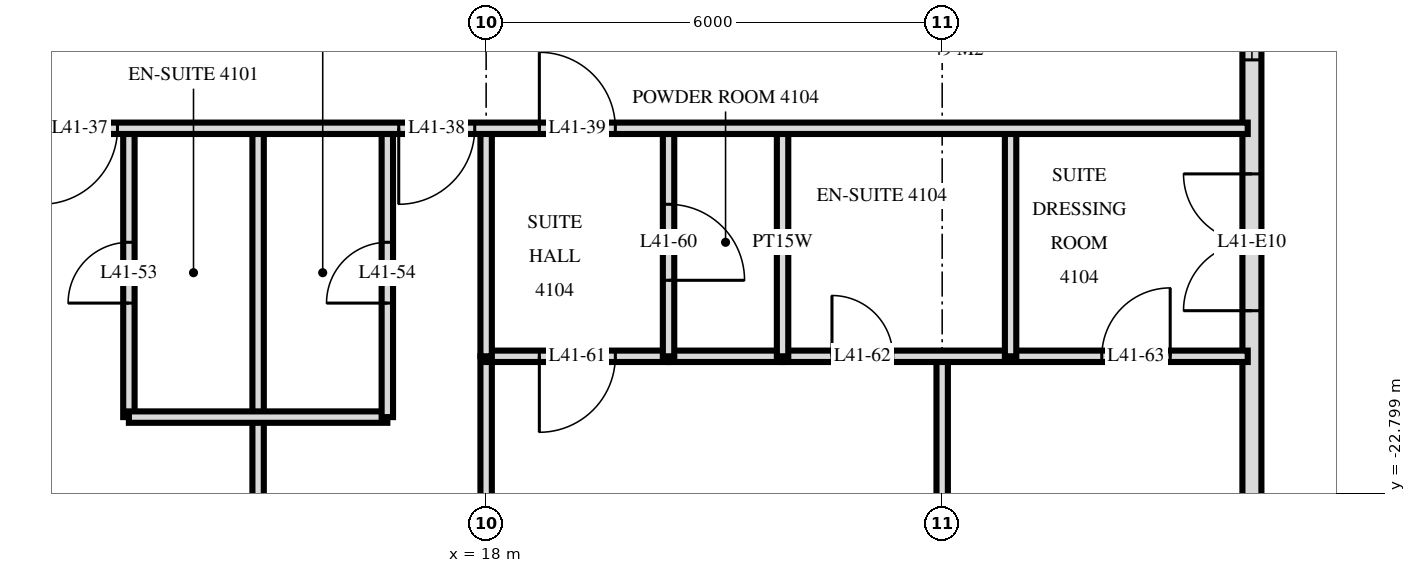
"""IFC4 building model, lengths in metres.
Left out: names, types, materials, properties, quantities, classifications, styles, units other than length and angle.
Written with IfcOpenShell. Run it as: python <this file> out.ifc"""

import sys

from ifc_helpers import new_model, si_unit, direction, frame, frame_2d, origin, place, context, subcontext, project, spatial, rectangle, extrude, element, fill, save


model = new_model("IFC4")
c1 = context("Model", 3, precision=1e-05, world=origin(), true_north=direction((0.0, 1.0)))
c2 = subcontext(c1, "Body", "Model", "MODEL_VIEW")
j1 = project(units=[si_unit("LENGTHUNIT", "METRE"), si_unit("PLANEANGLEUNIT", "RADIAN")], contexts=[c1])
p1 = place(None, origin())
s1 = spatial("IfcSite", under=j1, at=p1, CompositionType="ELEMENT")
p2 = place(p1, origin())
s2 = spatial("IfcBuilding", under=s1, at=p2, CompositionType="ELEMENT")
p3 = place(p2, frame((0.0, 0.0, 159.6)))
s3 = spatial("IfcBuildingStorey", under=s2, at=p3, CompositionType="ELEMENT", Elevation=159.6)
p4 = place(p3, frame((28.075, -29.275, 0.0), z_axis=(0.0, 0.0, 1.0), x_axis=(0.0, 1.0, 0.0)))
e1 = element("IfcWall", 1, at=p4, inside=s3, PredefinedType="SOLIDWALL", context=c2, shape_type="SweptSolid", body=[
    extrude(rectangle(XDim=25.951, YDim=0.25, at=frame_2d((12.975, 0.0))), origin(), (0.0, 0.0, 1.0), 3.32),
])
p5 = place(p4, frame((0.575, 0.0, 0.0)))
e2 = element("IfcOpeningElement", 2, at=p5, cuts=e1, PredefinedType="OPENING", context=c2, shape_type="SweptSolid", body=[
    extrude(rectangle(XDim=1.8, YDim=2.4, at=frame_2d((0.9, 1.2))), frame((0.0, 0.135, 0.0), z_axis=(0.0, -1.0, 0.0), x_axis=(1.0, 0.0, 0.0)), (0.0, 0.0, 1.0), 0.27),
])
p6 = place(p4, frame((3.325, 0.0, 0.3)))
e3 = element("IfcOpeningElement", 3, at=p6, cuts=e1, PredefinedType="OPENING", context=c2, shape_type="SweptSolid", body=[
    extrude(rectangle(XDim=1.8, YDim=2.1, at=frame_2d((0.9, 1.05))), frame((0.0, 0.135, 0.0), z_axis=(0.0, -1.0, 0.0), x_axis=(1.0, 0.0, 0.0)), (0.0, 0.0, 1.0), 0.27),
])
p7 = place(p4, frame((8.875, 0.0, 0.0)))
e4 = element("IfcOpeningElement", 4, at=p7, cuts=e1, PredefinedType="OPENING", context=c2, shape_type="SweptSolid", body=[
    extrude(rectangle(XDim=1.8, YDim=2.4, at=frame_2d((0.9, 1.2))), frame((0.0, 0.135, 0.0), z_axis=(0.0, -1.0, 0.0), x_axis=(1.0, 0.0, 0.0)), (0.0, 0.0, 1.0), 0.27),
])
p8 = place(p4, frame((12.175, 0.0, 0.3)))
e5 = element("IfcOpeningElement", 5, at=p8, cuts=e1, PredefinedType="OPENING", context=c2, shape_type="SweptSolid", body=[
    extrude(rectangle(XDim=1.2, YDim=2.1, at=frame_2d((0.6, 1.05))), frame((0.0, 0.135, 0.0), z_axis=(0.0, -1.0, 0.0), x_axis=(1.0, 0.0, 0.0)), (0.0, 0.0, 1.0), 0.27),
])
p9 = place(p4, frame((17.5, 0.0, 0.0)))
e6 = element("IfcOpeningElement", 6, at=p9, cuts=e1, PredefinedType="OPENING", context=c2, shape_type="SweptSolid", body=[
    extrude(rectangle(XDim=1.8, YDim=2.4, at=frame_2d((0.9, 1.2))), frame((0.0, 0.135, 0.0), z_axis=(0.0, -1.0, 0.0), x_axis=(1.0, 0.0, 0.0)), (0.0, 0.0, 1.0), 0.27),
])
p10 = place(p3, frame((24.9, -21.0, 0.0), z_axis=(0.0, 0.0, 1.0), x_axis=(0.0, 1.0, 0.0)))
e7 = element("IfcWall", 7, at=p10, inside=s3, PredefinedType="PARTITIONING", context=c2, shape_type="SweptSolid", body=[
    extrude(rectangle(XDim=3.0, YDim=0.15, at=frame_2d((1.5, 0.0))), origin(), (0.0, 0.0, 1.0), 3.32),
])
p11 = place(p3, frame((24.0, -33.557, 0.0), z_axis=(0.0, 0.0, 1.0), x_axis=(0.0, 1.0, 0.0)))
e8 = element("IfcWall", 8, at=p11, inside=s3, PredefinedType="PARTITIONING", context=c2, shape_type="SweptSolid", body=[
    extrude(rectangle(XDim=12.557, YDim=0.15, at=frame_2d((6.278, 0.0))), origin(), (0.0, 0.0, 1.0), 3.32),
])
p12 = place(p11, frame((5.737, 0.0, 0.0)))
e9 = element("IfcOpeningElement", 9, at=p12, cuts=e8, PredefinedType="OPENING", context=c2, shape_type="SweptSolid", body=[
    extrude(rectangle(XDim=0.9, YDim=2.1, at=frame_2d((0.45, 1.05))), frame((0.0, 0.085, 0.0), z_axis=(0.0, -1.0, 0.0), x_axis=(1.0, 0.0, 0.0)), (0.0, 0.0, 1.0), 0.17),
])
p13 = place(p3, frame((21.9, -21.0, 0.0), z_axis=(0.0, 0.0, 1.0), x_axis=(0.0, 1.0, 0.0)))
e10 = element("IfcWall", 10, at=p13, inside=s3, PredefinedType="PLUMBINGWALL", context=c2, shape_type="SweptSolid", body=[
    extrude(rectangle(XDim=3.0, YDim=0.15, at=frame_2d((1.5, 0.0))), origin(), (0.0, 0.0, 1.0), 3.32),
])
p14 = place(p3, frame((20.4, -21.0, 0.0), z_axis=(0.0, 0.0, 1.0), x_axis=(0.0, 1.0, 0.0)))
e11 = element("IfcWall", 11, at=p14, inside=s3, PredefinedType="PARTITIONING", context=c2, shape_type="SweptSolid", body=[
    extrude(rectangle(XDim=3.0, YDim=0.15, at=frame_2d((1.5, 0.0))), origin(), (0.0, 0.0, 1.0), 3.32),
])
p15 = place(p14, frame((1.0, 0.0, 0.0)))
e12 = element("IfcOpeningElement", 12, at=p15, cuts=e11, PredefinedType="OPENING", context=c2, shape_type="SweptSolid", body=[
    extrude(rectangle(XDim=1.0, YDim=2.1, at=frame_2d((0.5, 1.05))), frame((0.0, 0.085, 0.0), z_axis=(0.0, -1.0, 0.0), x_axis=(1.0, 0.0, 0.0)), (0.0, 0.0, 1.0), 0.17),
])
p16 = place(p3, frame((18.0, -21.0, 0.0), z_axis=(0.0, 0.0, 1.0), x_axis=(0.0, 1.0, 0.0)))
e13 = element("IfcWall", 13, at=p16, inside=s3, PredefinedType="PARTITIONING", context=c2, shape_type="SweptSolid", body=[
    extrude(rectangle(XDim=3.0, YDim=0.15, at=frame_2d((1.5, 0.0))), origin(), (0.0, 0.0, 1.0), 3.32),
])
p17 = place(p3, frame((18.0, -33.62, 0.0), z_axis=(0.0, 0.0, 1.0), x_axis=(0.0, 1.0, 0.0)))
e14 = element("IfcWall", 14, at=p17, inside=s3, PredefinedType="PARTITIONING", context=c2, shape_type="SweptSolid", body=[
    extrude(rectangle(XDim=12.62, YDim=0.15, at=frame_2d((6.31, 0.0))), origin(), (0.0, 0.0, 1.0), 3.32),
])
p18 = place(p3, frame((16.7, -21.8, 0.0), z_axis=(0.0, 0.0, 1.0), x_axis=(0.0, 1.0, 0.0)))
e15 = element("IfcWall", 15, at=p18, inside=s3, PredefinedType="PARTITIONING", context=c2, shape_type="SweptSolid", body=[
    extrude(rectangle(XDim=3.8, YDim=0.15, at=frame_2d((1.9, 0.0))), origin(), (0.0, 0.0, 1.0), 3.32),
])
p19 = place(p18, frame((1.5, 0.0, 0.0)))
e16 = element("IfcOpeningElement", 16, at=p19, cuts=e15, PredefinedType="OPENING", context=c2, shape_type="SweptSolid", body=[
    extrude(rectangle(XDim=0.8, YDim=2.1, at=frame_2d((0.4, 1.05))), frame((0.0, 0.085, 0.0), z_axis=(0.0, -1.0, 0.0), x_axis=(1.0, 0.0, 0.0)), (0.0, 0.0, 1.0), 0.17),
])
p20 = place(p3, frame((15.0, -33.62, 0.0), z_axis=(0.0, 0.0, 1.0), x_axis=(0.0, 1.0, 0.0)))
e17 = element("IfcWall", 17, at=p20, inside=s3, PredefinedType="PARTITIONING", context=c2, shape_type="SweptSolid", body=[
    extrude(rectangle(XDim=15.62, YDim=0.15, at=frame_2d((7.81, 0.0))), origin(), (0.0, 0.0, 1.0), 3.32),
])
p21 = place(p3, frame((13.3, -21.8, 0.0), z_axis=(0.0, 0.0, 1.0), x_axis=(0.0, 1.0, 0.0)))
e18 = element("IfcWall", 18, at=p21, inside=s3, PredefinedType="PARTITIONING", context=c2, shape_type="SweptSolid", body=[
    extrude(rectangle(XDim=3.8, YDim=0.15, at=frame_2d((1.9, 0.0))), origin(), (0.0, 0.0, 1.0), 3.32),
])
p22 = place(p21, frame((1.5, 0.0, 0.0)))
e19 = element("IfcOpeningElement", 19, at=p22, cuts=e18, PredefinedType="OPENING", context=c2, shape_type="SweptSolid", body=[
    extrude(rectangle(XDim=0.8, YDim=2.1, at=frame_2d((0.4, 1.05))), frame((0.0, 0.085, 0.0), z_axis=(0.0, -1.0, 0.0), x_axis=(1.0, 0.0, 0.0)), (0.0, 0.0, 1.0), 0.17),
])
p23 = place(p3, frame((13.3, -21.8, 0.0), z_axis=(0.0, 0.0, 1.0), x_axis=(1.0, 0.0, 0.0)))
e20 = element("IfcWall", 20, at=p23, inside=s3, PredefinedType="PARTITIONING", context=c2, shape_type="SweptSolid", body=[
    extrude(rectangle(XDim=3.4, YDim=0.15, at=frame_2d((1.7, 0.0))), origin(), (0.0, 0.0, 1.0), 3.32),
])
p24 = place(p3, frame((18.0, -21.0, 0.0), z_axis=(0.0, 0.0, 1.0), x_axis=(1.0, 0.0, 0.0)))
e21 = element("IfcWall", 21, at=p24, inside=s3, PredefinedType="PARTITIONING", context=c2, shape_type="SweptSolid", body=[
    extrude(rectangle(XDim=2.4, YDim=0.15, at=frame_2d((1.2, 0.0))), origin(), (0.0, 0.0, 1.0), 3.32),
])
p25 = place(p24, frame((0.7, 0.0, 0.0)))
e22 = element("IfcOpeningElement", 22, at=p25, cuts=e21, PredefinedType="OPENING", context=c2, shape_type="SweptSolid", body=[
    extrude(rectangle(XDim=1.0, YDim=2.1, at=frame_2d((0.5, 1.05))), frame((0.0, 0.085, 0.0), z_axis=(0.0, -1.0, 0.0), x_axis=(1.0, 0.0, 0.0)), (0.0, 0.0, 1.0), 0.17),
])
p26 = place(p3, frame((21.9, -21.0, 0.0), z_axis=(0.0, 0.0, 1.0), x_axis=(1.0, 0.0, 0.0)))
e23 = element("IfcWall", 23, at=p26, inside=s3, PredefinedType="PARTITIONING", context=c2, shape_type="SweptSolid", body=[
    extrude(rectangle(XDim=6.12, YDim=0.15, at=frame_2d((3.06, 0.0))), origin(), (0.0, 0.0, 1.0), 3.32),
])
p27 = place(p26, frame((0.65, 0.0, 0.0)))
e24 = element("IfcOpeningElement", 24, at=p27, cuts=e23, PredefinedType="OPENING", context=c2, shape_type="SweptSolid", body=[
    extrude(rectangle(XDim=0.8, YDim=2.1, at=frame_2d((0.4, 1.05))), frame((0.0, 0.085, 0.0), z_axis=(0.0, -1.0, 0.0), x_axis=(1.0, 0.0, 0.0)), (0.0, 0.0, 1.0), 0.17),
])
p28 = place(p26, frame((4.2, 0.0, 0.0)))
e25 = element("IfcOpeningElement", 25, at=p28, cuts=e23, PredefinedType="OPENING", context=c2, shape_type="SweptSolid", body=[
    extrude(rectangle(XDim=0.9, YDim=2.1, at=frame_2d((0.45, 1.05))), frame((0.0, 0.085, 0.0), z_axis=(0.0, -1.0, 0.0), x_axis=(1.0, 0.0, 0.0)), (0.0, 0.0, 1.0), 0.17),
])
p29 = place(p3, frame((20.4, -21.0, 0.0), z_axis=(0.0, 0.0, 1.0), x_axis=(1.0, 0.0, 0.0)))
e26 = element("IfcWall", 26, at=p29, inside=s3, PredefinedType="PLUMBINGWALL", context=c2, shape_type="SweptSolid", body=[
    extrude(rectangle(XDim=1.5, YDim=0.15, at=frame_2d((0.75, 0.0))), origin(), (0.0, 0.0, 1.0), 3.32),
])
p30 = place(p3, frame((-28.02, -18.0, 0.0), z_axis=(0.0, 0.0, 1.0), x_axis=(1.0, 0.0, 0.0)))
e27 = element("IfcWall", 27, at=p30, inside=s3, PredefinedType="PARTITIONING", context=c2, shape_type="SweptSolid", body=[
    extrude(rectangle(XDim=56.04, YDim=0.15, at=frame_2d((28.02, 0.0))), origin(), (0.0, 0.0, 1.0), 3.32),
])
p31 = place(p30, frame((14.32, 0.0, 0.0)))
e28 = element("IfcOpeningElement", 28, at=p31, cuts=e27, PredefinedType="OPENING", context=c2, shape_type="SweptSolid", body=[
    extrude(rectangle(XDim=1.0, YDim=2.1, at=frame_2d((0.5, 1.05))), frame((0.0, 0.085, 0.0), z_axis=(0.0, -1.0, 0.0), x_axis=(1.0, 0.0, 0.0)), (0.0, 0.0, 1.0), 0.17),
])
p32 = place(p30, frame((40.17, 0.0, 0.0)))
e29 = element("IfcOpeningElement", 29, at=p32, cuts=e27, PredefinedType="OPENING", context=c2, shape_type="SweptSolid", body=[
    extrude(rectangle(XDim=1.0, YDim=2.1, at=frame_2d((0.5, 1.05))), frame((0.0, 0.085, 0.0), z_axis=(0.0, -1.0, 0.0), x_axis=(1.0, 0.0, 0.0)), (0.0, 0.0, 1.0), 0.17),
])
p33 = place(p30, frame((44.87, 0.0, 0.0)))
e30 = element("IfcOpeningElement", 30, at=p33, cuts=e27, PredefinedType="OPENING", context=c2, shape_type="SweptSolid", body=[
    extrude(rectangle(XDim=1.0, YDim=2.1, at=frame_2d((0.5, 1.05))), frame((0.0, 0.085, 0.0), z_axis=(0.0, -1.0, 0.0), x_axis=(1.0, 0.0, 0.0)), (0.0, 0.0, 1.0), 0.17),
])
p34 = place(p30, frame((46.72, 0.0, 0.0)))
e31 = element("IfcOpeningElement", 31, at=p34, cuts=e27, PredefinedType="OPENING", context=c2, shape_type="SweptSolid", body=[
    extrude(rectangle(XDim=1.0, YDim=2.1, at=frame_2d((0.5, 1.05))), frame((0.0, 0.085, 0.0), z_axis=(0.0, -1.0, 0.0), x_axis=(1.0, 0.0, 0.0)), (0.0, 0.0, 1.0), 0.17),
])
p35 = place(p30, frame((18.52, 0.0, 0.0)))
e32 = element("IfcOpeningElement", 32, at=p35, cuts=e27, PredefinedType="OPENING", context=c2, shape_type="SweptSolid", body=[
    extrude(rectangle(XDim=1.0, YDim=2.1, at=frame_2d((0.5, 1.05))), frame((0.0, 0.085, 0.0), z_axis=(0.0, -1.0, 0.0), x_axis=(1.0, 0.0, 0.0)), (0.0, 0.0, 1.0), 0.17),
])
p36 = place(p30, frame((24.52, 0.0, 0.0)))
e33 = element("IfcOpeningElement", 33, at=p36, cuts=e27, PredefinedType="OPENING", context=c2, shape_type="SweptSolid", body=[
    extrude(rectangle(XDim=1.0, YDim=2.1, at=frame_2d((0.5, 1.05))), frame((0.0, 0.085, 0.0), z_axis=(0.0, -1.0, 0.0), x_axis=(1.0, 0.0, 0.0)), (0.0, 0.0, 1.0), 0.17),
])
p37 = place(p30, frame((30.52, 0.0, 0.0)))
e34 = element("IfcOpeningElement", 34, at=p37, cuts=e27, PredefinedType="OPENING", context=c2, shape_type="SweptSolid", body=[
    extrude(rectangle(XDim=1.0, YDim=2.1, at=frame_2d((0.5, 1.05))), frame((0.0, 0.085, 0.0), z_axis=(0.0, -1.0, 0.0), x_axis=(1.0, 0.0, 0.0)), (0.0, 0.0, 1.0), 0.17),
])
p38 = place(p30, frame((36.52, 0.0, 0.0)))
e35 = element("IfcOpeningElement", 35, at=p38, cuts=e27, PredefinedType="OPENING", context=c2, shape_type="SweptSolid", body=[
    extrude(rectangle(XDim=1.0, YDim=2.1, at=frame_2d((0.5, 1.05))), frame((0.0, 0.085, 0.0), z_axis=(0.0, -1.0, 0.0), x_axis=(1.0, 0.0, 0.0)), (0.0, 0.0, 1.0), 0.17),
])
p39 = place(p7, origin())
e36 = element("IfcDoor", 36, at=p39, inside=s3, OperationType="DOUBLE_DOOR_SINGLE_SWING", PredefinedType="DOOR", context=c2, shape_type="SweptSolid", body=[
    extrude(rectangle(XDim=1.8, YDim=2.4, at=frame_2d((0.9, 1.2))), frame((0.0, 0.025, 0.0), z_axis=(0.0, -1.0, 0.0), x_axis=(1.0, 0.0, 0.0)), (0.0, 0.0, 1.0), 0.05),
])
fill(e4, e36)
p40 = place(p8, origin())
e37 = element("IfcWindow", 37, at=p40, inside=s3, PartitioningType="SINGLE_PANEL", PredefinedType="WINDOW", context=c2, shape_type="SweptSolid", body=[
    extrude(rectangle(XDim=1.2, YDim=2.1, at=frame_2d((0.6, 1.05))), frame((0.0, 0.03, 0.0), z_axis=(0.0, -1.0, 0.0), x_axis=(1.0, 0.0, 0.0)), (0.0, 0.0, 1.0), 0.06),
])
fill(e5, e37)
p41 = place(p32, frame((0.5, 0.0, 0.0), z_axis=(0.0, 0.0, 1.0), x_axis=(-1.0, 0.0, 0.0)))
e38 = element("IfcDoor", 38, at=p41, inside=s3, OperationType="SINGLE_SWING_LEFT", PredefinedType="DOOR", context=c2, shape_type="SweptSolid", body=[
    extrude(rectangle(XDim=1.0, YDim=2.1, at=frame_2d((0.0, 1.05))), frame((0.0, -0.025, 0.0), z_axis=(0.0, 1.0, 0.0), x_axis=(-1.0, 0.0, 0.0)), (0.0, 0.0, 1.0), 0.05),
])
fill(e29, e38)
p42 = place(p33, frame((0.5, 0.0, 0.0), z_axis=(0.0, 0.0, 1.0), x_axis=(-1.0, 0.0, 0.0)))
e39 = element("IfcDoor", 39, at=p42, inside=s3, OperationType="SINGLE_SWING_LEFT", PredefinedType="DOOR", context=c2, shape_type="SweptSolid", body=[
    extrude(rectangle(XDim=1.0, YDim=2.1, at=frame_2d((0.0, 1.05))), frame((0.0, -0.025, 0.0), z_axis=(0.0, 1.0, 0.0), x_axis=(-1.0, 0.0, 0.0)), (0.0, 0.0, 1.0), 0.05),
])
fill(e30, e39)
p43 = place(p34, origin())
e40 = element("IfcDoor", 40, at=p43, inside=s3, OperationType="SINGLE_SWING_RIGHT", PredefinedType="DOOR", context=c2, shape_type="SweptSolid", body=[
    extrude(rectangle(XDim=1.0, YDim=2.1, at=frame_2d((0.5, 1.05))), frame((0.0, 0.025, 0.0), z_axis=(0.0, -1.0, 0.0), x_axis=(1.0, 0.0, 0.0)), (0.0, 0.0, 1.0), 0.05),
])
fill(e31, e40)
p44 = place(p22, origin())
e41 = element("IfcDoor", 41, at=p44, inside=s3, OperationType="SINGLE_SWING_RIGHT", PredefinedType="DOOR", context=c2, shape_type="SweptSolid", body=[
    extrude(rectangle(XDim=0.8, YDim=2.1, at=frame_2d((0.4, 1.05))), frame((0.0, 0.025, 0.0), z_axis=(0.0, -1.0, 0.0), x_axis=(1.0, 0.0, 0.0)), (0.0, 0.0, 1.0), 0.05),
])
fill(e19, e41)
p45 = place(p19, origin())
e42 = element("IfcDoor", 42, at=p45, inside=s3, OperationType="SINGLE_SWING_RIGHT", PredefinedType="DOOR", context=c2, shape_type="SweptSolid", body=[
    extrude(rectangle(XDim=0.8, YDim=2.1, at=frame_2d((0.4, 1.05))), frame((0.0, 0.025, 0.0), z_axis=(0.0, -1.0, 0.0), x_axis=(1.0, 0.0, 0.0)), (0.0, 0.0, 1.0), 0.05),
])
fill(e16, e42)
p46 = place(p15, frame((0.5, 0.0, 0.0), z_axis=(0.0, 0.0, 1.0), x_axis=(-1.0, 0.0, 0.0)))
e43 = element("IfcDoor", 43, at=p46, inside=s3, OperationType="SINGLE_SWING_LEFT", PredefinedType="DOOR", context=c2, shape_type="SweptSolid", body=[
    extrude(rectangle(XDim=1.0, YDim=2.1, at=frame_2d((0.0, 1.05))), frame((0.0, -0.025, 0.0), z_axis=(0.0, 1.0, 0.0), x_axis=(-1.0, 0.0, 0.0)), (0.0, 0.0, 1.0), 0.05),
])
fill(e12, e43)
p47 = place(p25, frame((0.5, 0.0, 0.0), z_axis=(0.0, 0.0, 1.0), x_axis=(-1.0, 0.0, 0.0)))
e44 = element("IfcDoor", 44, at=p47, inside=s3, OperationType="SINGLE_SWING_LEFT", PredefinedType="DOOR", context=c2, shape_type="SweptSolid", body=[
    extrude(rectangle(XDim=1.0, YDim=2.1, at=frame_2d((0.0, 1.05))), frame((0.0, -0.025, 0.0), z_axis=(0.0, 1.0, 0.0), x_axis=(-1.0, 0.0, 0.0)), (0.0, 0.0, 1.0), 0.05),
])
fill(e22, e44)
p48 = place(p27, origin())
e45 = element("IfcDoor", 45, at=p48, inside=s3, OperationType="SINGLE_SWING_RIGHT", PredefinedType="DOOR", context=c2, shape_type="SweptSolid", body=[
    extrude(rectangle(XDim=0.8, YDim=2.1, at=frame_2d((0.4, 1.05))), frame((0.0, 0.025, 0.0), z_axis=(0.0, -1.0, 0.0), x_axis=(1.0, 0.0, 0.0)), (0.0, 0.0, 1.0), 0.05),
])
fill(e24, e45)
p49 = place(p28, origin())
e46 = element("IfcDoor", 46, at=p49, inside=s3, OperationType="SINGLE_SWING_LEFT", PredefinedType="DOOR", context=c2, shape_type="SweptSolid", body=[
    extrude(rectangle(XDim=0.9, YDim=2.1, at=frame_2d((0.45, 1.05))), frame((0.0, 0.025, 0.0), z_axis=(0.0, -1.0, 0.0), x_axis=(1.0, 0.0, 0.0)), (0.0, 0.0, 1.0), 0.05),
])
fill(e25, e46)
save(model, sys.argv[1])
